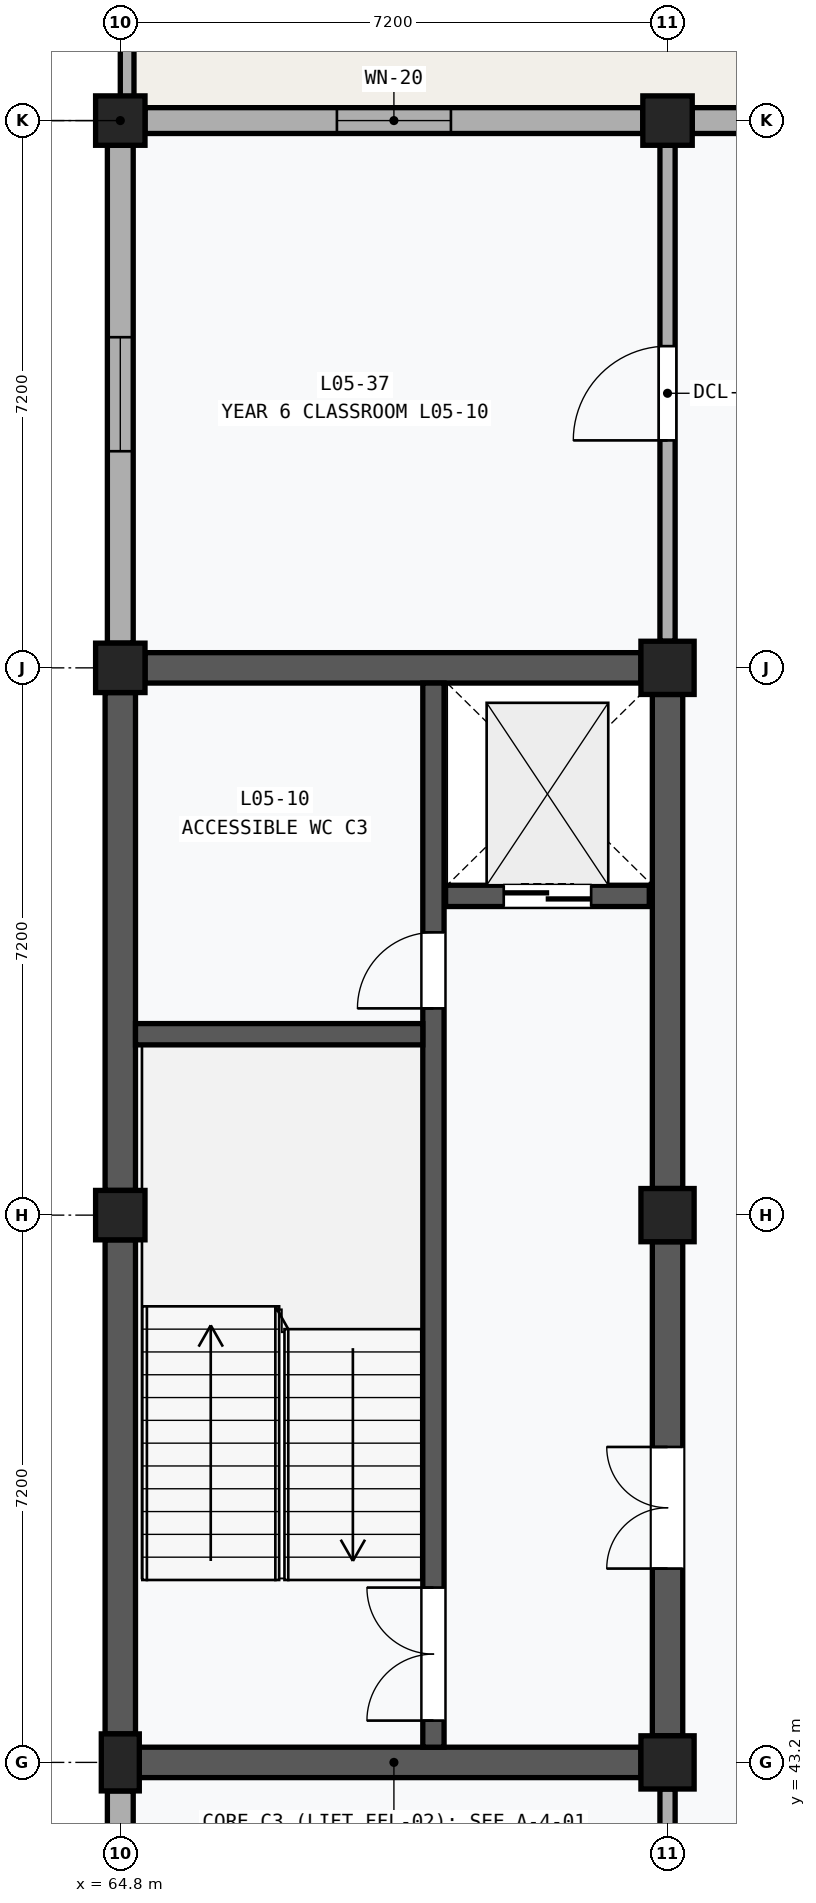
"""IFC4 building model, lengths in metres.
Left out: names, types, materials, properties, quantities, classifications, styles, units other than length and angle.
Written with IfcOpenShell. Run it as: python <this file> out.ifc"""

import sys

from ifc_helpers import new_model, si_unit, direction, frame, frame_2d, origin, origin_2d, place, context, subcontext, project, spatial, rectangle, extrude, element, fill, save


model = new_model("IFC4")
c1 = context("Model", 3, precision=1e-05, world=origin(), true_north=direction((0.0, 1.0)))
c2 = subcontext(c1, "Body", "Model", "MODEL_VIEW")
j1 = project(units=[si_unit("LENGTHUNIT", "METRE"), si_unit("PLANEANGLEUNIT", "RADIAN")], contexts=[c1])
p1 = place(None, origin())
s1 = spatial("IfcSite", under=j1, at=p1, CompositionType="ELEMENT")
p2 = place(p1, origin())
s2 = spatial("IfcBuilding", under=s1, at=p2, CompositionType="ELEMENT")
p3 = place(p2, frame((0.0, 0.0, 22.6)))
s3 = spatial("IfcBuildingStorey", under=s2, at=p3, CompositionType="ELEMENT", Elevation=22.6)
p4 = place(p3, frame((64.8, 43.2, 0.0), z_axis=(0.0, 0.0, 1.0), x_axis=(1.0, 0.0, 0.0)))
e1 = element("IfcColumn", 1, at=p4, inside=s3, PredefinedType="PILASTER", context=c2, shape_type="SweptSolid", body=[
    extrude(rectangle(XDim=0.5, YDim=0.75, at=origin_2d()), origin(), (0.0, 0.0, 1.0), 4.0),
])
for number, where, z_axis, x_axis in (
    (2, (64.8, 50.4, 0.0), (0.0, 0.0, 1.0), (1.0, 0.0, 0.0)),
    (3, (64.8, 57.6, 0.0), (0.0, 0.0, 1.0), (1.0, 0.0, 0.0)),
    (4, (64.8, 64.8, 0.0), (0.0, 0.0, 1.0), (1.0, 0.0, 0.0)),
):
    element("IfcColumn", number, at=place(p3, frame(where, z_axis=z_axis, x_axis=x_axis)), inside=s3, PredefinedType="COLUMN", context=c2, shape_type="SweptSolid", body=[
        extrude(rectangle(XDim=0.65, YDim=0.65, at=origin_2d()), origin(), (0.0, 0.0, 1.0), 4.0),
    ])
for number, where, z_axis, x_axis in (
    (5, (72.0, 43.2, 0.0), (0.0, 0.0, 1.0), (1.0, 0.0, 0.0)),
    (6, (72.0, 50.4, 0.0), (0.0, 0.0, 1.0), (1.0, 0.0, 0.0)),
    (7, (72.0, 57.6, 0.0), (0.0, 0.0, 1.0), (1.0, 0.0, 0.0)),
):
    element("IfcColumn", number, at=place(p3, frame(where, z_axis=z_axis, x_axis=x_axis)), inside=s3, PredefinedType="COLUMN", context=c2, shape_type="SweptSolid", body=[
        extrude(rectangle(XDim=0.7, YDim=0.7, at=origin_2d()), origin(), (0.0, 0.0, 1.0), 4.0),
    ])
p5 = place(p3, frame((72.0, 64.8, 0.0), z_axis=(0.0, 0.0, 1.0), x_axis=(1.0, 0.0, 0.0)))
e8 = element("IfcColumn", 8, at=p5, inside=s3, PredefinedType="COLUMN", context=c2, shape_type="SweptSolid", body=[
    extrude(rectangle(XDim=0.65, YDim=0.65, at=origin_2d()), origin(), (0.0, 0.0, 1.0), 4.0),
])
p6 = place(p3, frame((64.8, 36.325, 0.0), z_axis=(0.0, 0.0, 1.0), x_axis=(0.0, 1.0, 0.0)))
e9 = element("IfcWall", 9, at=p6, inside=s3, PredefinedType="SOLIDWALL", context=c2, shape_type="SweptSolid", body=[
    extrude(rectangle(XDim=6.5, YDim=0.34, at=frame_2d((3.25, 0.0))), origin(), (0.0, 0.0, 1.0), 3.12),
])
p7 = place(p6, frame((1.75, 0.0, 0.9)))
e10 = element("IfcOpeningElement", 10, at=p7, cuts=e9, PredefinedType="OPENING", context=c2, shape_type="SweptSolid", body=[
    extrude(rectangle(XDim=3.0, YDim=1.8, at=frame_2d((1.5, 0.9))), frame((0.0, 0.182, 0.0), z_axis=(0.0, -1.0, 0.0), x_axis=(1.0, 0.0, 0.0)), (0.0, 0.0, 1.0), 0.364),
])
p8 = place(p3, frame((65.125, 64.8, 0.0), z_axis=(0.0, 0.0, 1.0), x_axis=(1.0, 0.0, 0.0)))
e11 = element("IfcWall", 11, at=p8, inside=s3, PredefinedType="SOLIDWALL", context=c2, shape_type="SweptSolid", body=[
    extrude(rectangle(XDim=6.55, YDim=0.34, at=frame_2d((3.275, 0.0))), origin(), (0.0, 0.0, 1.0), 3.12),
])
p9 = place(p8, frame((2.525, 0.0, 1.1)))
e12 = element("IfcOpeningElement", 12, at=p9, cuts=e11, PredefinedType="OPENING", context=c2, shape_type="SweptSolid", body=[
    extrude(rectangle(XDim=1.5, YDim=1.35, at=frame_2d((0.75, 0.675))), frame((0.0, 0.182, 0.0), z_axis=(0.0, -1.0, 0.0), x_axis=(1.0, 0.0, 0.0)), (0.0, 0.0, 1.0), 0.364),
])
p10 = place(p3, frame((64.8, 57.925, 0.0), z_axis=(0.0, 0.0, 1.0), x_axis=(0.0, 1.0, 0.0)))
e13 = element("IfcWall", 13, at=p10, inside=s3, PredefinedType="SOLIDWALL", context=c2, shape_type="SweptSolid", body=[
    extrude(rectangle(XDim=6.55, YDim=0.34, at=frame_2d((3.275, 0.0))), origin(), (0.0, 0.0, 1.0), 3.12),
])
p11 = place(p10, frame((2.525, 0.0, 1.1)))
e14 = element("IfcOpeningElement", 14, at=p11, cuts=e13, PredefinedType="OPENING", context=c2, shape_type="SweptSolid", body=[
    extrude(rectangle(XDim=1.5, YDim=1.35, at=frame_2d((0.75, 0.675))), frame((0.0, 0.182, 0.0), z_axis=(0.0, -1.0, 0.0), x_axis=(1.0, 0.0, 0.0)), (0.0, 0.0, 1.0), 0.364),
])
p12 = place(p3, frame((72.325, 64.8, 0.0), z_axis=(0.0, 0.0, 1.0), x_axis=(1.0, 0.0, 0.0)))
e15 = element("IfcWall", 15, at=p12, inside=s3, PredefinedType="SOLIDWALL", context=c2, shape_type="SweptSolid", body=[
    extrude(rectangle(XDim=6.625, YDim=0.34, at=frame_2d((3.312, 0.0))), origin(), (0.0, 0.0, 1.0), 3.12),
])
p13 = place(p12, frame((2.562, 0.0, 1.1)))
e16 = element("IfcOpeningElement", 16, at=p13, cuts=e15, PredefinedType="OPENING", context=c2, shape_type="SweptSolid", body=[
    extrude(rectangle(XDim=1.5, YDim=1.35, at=frame_2d((0.75, 0.675))), frame((0.0, 0.182, 0.0), z_axis=(0.0, -1.0, 0.0), x_axis=(1.0, 0.0, 0.0)), (0.0, 0.0, 1.0), 0.364),
])
p14 = place(p3, frame((64.89, 64.89, 0.0), z_axis=(0.0, 0.0, 1.0), x_axis=(0.0, 1.0, 0.0)))
e17 = element("IfcWall", 17, at=p14, inside=s3, PredefinedType="PARAPET", context=c2, shape_type="SweptSolid", body=[
    extrude(rectangle(XDim=7.02, YDim=0.18, at=frame_2d((3.51, 0.0))), origin(), (0.0, 0.0, 1.0), 0.95),
])
p15 = place(p3, frame((64.8, 43.575, 0.0), z_axis=(0.0, 0.0, 1.0), x_axis=(0.0, 1.0, 0.0)))
e18 = element("IfcWall", 18, at=p15, inside=s3, PredefinedType="SHEAR", context=c2, shape_type="SweptSolid", body=[
    extrude(rectangle(XDim=6.5, YDim=0.4, at=frame_2d((3.25, 0.0))), origin(), (0.0, 0.0, 1.0), 3.12),
])
p16 = place(p3, frame((64.8, 50.725, 0.0), z_axis=(0.0, 0.0, 1.0), x_axis=(0.0, 1.0, 0.0)))
e19 = element("IfcWall", 19, at=p16, inside=s3, PredefinedType="SHEAR", context=c2, shape_type="SweptSolid", body=[
    extrude(rectangle(XDim=6.55, YDim=0.4, at=frame_2d((3.275, 0.0))), origin(), (0.0, 0.0, 1.0), 3.12),
])
p17 = place(p3, frame((72.0, 43.55, 0.0), z_axis=(0.0, 0.0, 1.0), x_axis=(0.0, 1.0, 0.0)))
e20 = element("IfcWall", 20, at=p17, inside=s3, PredefinedType="SHEAR", context=c2, shape_type="SweptSolid", body=[
    extrude(rectangle(XDim=6.5, YDim=0.4, at=frame_2d((3.25, 0.0))), origin(), (0.0, 0.0, 1.0), 2.98),
])
p18 = place(p17, frame((2.2, 0.0, 0.0)))
e21 = element("IfcOpeningElement", 21, at=p18, cuts=e20, PredefinedType="OPENING", context=c2, shape_type="SweptSolid", body=[
    extrude(rectangle(XDim=1.6, YDim=2.2, at=frame_2d((0.8, 1.1))), frame((0.0, 0.212, 0.0), z_axis=(0.0, -1.0, 0.0), x_axis=(1.0, 0.0, 0.0)), (0.0, 0.0, 1.0), 0.424),
])
p19 = place(p3, frame((72.0, 50.75, 0.0), z_axis=(0.0, 0.0, 1.0), x_axis=(0.0, 1.0, 0.0)))
e22 = element("IfcWall", 22, at=p19, inside=s3, PredefinedType="SHEAR", context=c2, shape_type="SweptSolid", body=[
    extrude(rectangle(XDim=6.5, YDim=0.4, at=frame_2d((3.25, 0.0))), origin(), (0.0, 0.0, 1.0), 2.98),
])
p20 = place(p3, frame((65.05, 43.2, 0.0), z_axis=(0.0, 0.0, 1.0), x_axis=(1.0, 0.0, 0.0)))
e23 = element("IfcWall", 23, at=p20, inside=s3, PredefinedType="SHEAR", context=c2, shape_type="SweptSolid", body=[
    extrude(rectangle(XDim=6.6, YDim=0.4, at=frame_2d((3.3, 0.0))), origin(), (0.0, 0.0, 1.0), 2.98),
])
p21 = place(p3, frame((65.125, 57.6, 0.0), z_axis=(0.0, 0.0, 1.0), x_axis=(1.0, 0.0, 0.0)))
e24 = element("IfcWall", 24, at=p21, inside=s3, PredefinedType="SHEAR", context=c2, shape_type="SweptSolid", body=[
    extrude(rectangle(XDim=6.525, YDim=0.4, at=frame_2d((3.262, 0.0))), origin(), (0.0, 0.0, 1.0), 2.98),
])
p22 = place(p3, frame((68.92, 43.4, 0.0), z_axis=(0.0, 0.0, 1.0), x_axis=(0.0, 1.0, 0.0)))
e25 = element("IfcWall", 25, at=p22, inside=s3, PredefinedType="SHEAR", context=c2, shape_type="SweptSolid", body=[
    extrude(rectangle(XDim=14.0, YDim=0.28, at=frame_2d((7.0, 0.0))), origin(), (0.0, 0.0, 1.0), 3.75),
])
p23 = place(p22, frame((0.35, 0.0, 0.0)))
e26 = element("IfcOpeningElement", 26, at=p23, cuts=e25, PredefinedType="OPENING", context=c2, shape_type="SweptSolid", body=[
    extrude(rectangle(XDim=1.75, YDim=2.15, at=frame_2d((0.875, 1.075))), frame((0.0, 0.152, 0.0), z_axis=(0.0, -1.0, 0.0), x_axis=(1.0, 0.0, 0.0)), (0.0, 0.0, 1.0), 0.304),
])
p24 = place(p22, frame((9.72, 0.0, 0.0)))
e27 = element("IfcOpeningElement", 27, at=p24, cuts=e25, PredefinedType="OPENING", context=c2, shape_type="SweptSolid", body=[
    extrude(rectangle(XDim=1.0, YDim=2.15, at=frame_2d((0.5, 1.075))), frame((0.0, 0.152, 0.0), z_axis=(0.0, -1.0, 0.0), x_axis=(1.0, 0.0, 0.0)), (0.0, 0.0, 1.0), 0.304),
])
p25 = place(p3, frame((65.0, 52.78, 0.0), z_axis=(0.0, 0.0, 1.0), x_axis=(1.0, 0.0, 0.0)))
e28 = element("IfcWall", 28, at=p25, inside=s3, PredefinedType="SHEAR", context=c2, shape_type="SweptSolid", body=[
    extrude(rectangle(XDim=3.78, YDim=0.28, at=frame_2d((1.89, 0.0))), origin(), (0.0, 0.0, 1.0), 3.75),
])
p26 = place(p3, frame((69.08, 54.6, 0.0), z_axis=(0.0, 0.0, 1.0), x_axis=(1.0, 0.0, 0.0)))
e29 = element("IfcWall", 29, at=p26, inside=s3, PredefinedType="SHEAR", context=c2, shape_type="SweptSolid", body=[
    extrude(rectangle(XDim=2.68, YDim=0.28, at=frame_2d((1.34, 0.0))), origin(), (0.0, 0.0, 1.0), 3.75),
])
p27 = place(p26, frame((0.765, 0.0, 0.0)))
e30 = element("IfcOpeningElement", 30, at=p27, cuts=e29, PredefinedType="OPENING", context=c2, shape_type="SweptSolid", body=[
    extrude(rectangle(XDim=1.15, YDim=2.2, at=frame_2d((0.575, 1.1))), frame((0.0, 0.152, 0.0), z_axis=(0.0, -1.0, 0.0), x_axis=(1.0, 0.0, 0.0)), (0.0, 0.0, 1.0), 0.304),
])
p28 = place(p3, frame((72.0, 36.35, 0.0), z_axis=(0.0, 0.0, 1.0), x_axis=(0.0, 1.0, 0.0)))
e31 = element("IfcWall", 31, at=p28, inside=s3, PredefinedType="PARTITIONING", context=c2, shape_type="SweptSolid", body=[
    extrude(rectangle(XDim=6.5, YDim=0.2, at=frame_2d((3.25, 0.0))), origin(), (0.0, 0.0, 1.0), 2.98),
])
p29 = place(p28, frame((2.65, 0.0, 0.0)))
e32 = element("IfcOpeningElement", 32, at=p29, cuts=e31, PredefinedType="OPENING", context=c2, shape_type="SweptSolid", body=[
    extrude(rectangle(XDim=1.2, YDim=2.24, at=frame_2d((0.6, 1.12))), frame((0.0, 0.112, 0.0), z_axis=(0.0, -1.0, 0.0), x_axis=(1.0, 0.0, 0.0)), (0.0, 0.0, 1.0), 0.224),
])
p30 = place(p3, frame((72.0, 57.95, 0.0), z_axis=(0.0, 0.0, 1.0), x_axis=(0.0, 1.0, 0.0)))
e33 = element("IfcWall", 33, at=p30, inside=s3, PredefinedType="PARTITIONING", context=c2, shape_type="SweptSolid", body=[
    extrude(rectangle(XDim=6.525, YDim=0.2, at=frame_2d((3.263, 0.0))), origin(), (0.0, 0.0, 1.0), 2.98),
])
p31 = place(p30, frame((2.643, 0.0, 0.0)))
e34 = element("IfcOpeningElement", 34, at=p31, cuts=e33, PredefinedType="OPENING", context=c2, shape_type="SweptSolid", body=[
    extrude(rectangle(XDim=1.24, YDim=2.26, at=frame_2d((0.62, 1.13))), frame((0.0, 0.112, 0.0), z_axis=(0.0, -1.0, 0.0), x_axis=(1.0, 0.0, 0.0)), (0.0, 0.0, 1.0), 0.224),
])
p32 = place(p9, origin())
e35 = element("IfcWindow", 35, at=p32, inside=s3, PartitioningType="SINGLE_PANEL", PredefinedType="WINDOW", context=c2, shape_type="SweptSolid", body=[
    extrude(rectangle(XDim=1.5, YDim=1.35, at=frame_2d((0.75, 0.675))), frame((0.0, 0.03, 0.0), z_axis=(0.0, -1.0, 0.0), x_axis=(1.0, 0.0, 0.0)), (0.0, 0.0, 1.0), 0.06),
])
fill(e12, e35)
p33 = place(p11, origin())
e36 = element("IfcWindow", 36, at=p33, inside=s3, PartitioningType="SINGLE_PANEL", PredefinedType="WINDOW", context=c2, shape_type="SweptSolid", body=[
    extrude(rectangle(XDim=1.5, YDim=1.35, at=frame_2d((0.75, 0.675))), frame((0.0, 0.03, 0.0), z_axis=(0.0, -1.0, 0.0), x_axis=(1.0, 0.0, 0.0)), (0.0, 0.0, 1.0), 0.06),
])
fill(e14, e36)
p34 = place(p18, origin())
e37 = element("IfcDoor", 37, at=p34, inside=s3, OperationType="DOUBLE_DOOR_SINGLE_SWING", PredefinedType="DOOR", context=c2, shape_type="SweptSolid", body=[
    extrude(rectangle(XDim=1.6, YDim=2.2, at=frame_2d((0.8, 1.1))), frame((0.0, 0.025, 0.0), z_axis=(0.0, -1.0, 0.0), x_axis=(1.0, 0.0, 0.0)), (0.0, 0.0, 1.0), 0.05),
])
fill(e21, e37)
p35 = place(p23, origin())
e38 = element("IfcDoor", 38, at=p35, inside=s3, OperationType="DOUBLE_DOOR_SINGLE_SWING", PredefinedType="DOOR", context=c2, shape_type="SweptSolid", body=[
    extrude(rectangle(XDim=1.75, YDim=2.15, at=frame_2d((0.875, 1.075))), frame((0.0, 0.025, 0.0), z_axis=(0.0, -1.0, 0.0), x_axis=(1.0, 0.0, 0.0)), (0.0, 0.0, 1.0), 0.05),
])
fill(e26, e38)
p36 = place(p24, origin())
e39 = element("IfcDoor", 39, at=p36, inside=s3, OperationType="SINGLE_SWING_LEFT", PredefinedType="DOOR", context=c2, shape_type="SweptSolid", body=[
    extrude(rectangle(XDim=1.0, YDim=2.15, at=frame_2d((0.5, 1.075))), frame((0.0, 0.025, 0.0), z_axis=(0.0, -1.0, 0.0), x_axis=(1.0, 0.0, 0.0)), (0.0, 0.0, 1.0), 0.05),
])
fill(e27, e39)
p37 = place(p27, frame((1.15, 0.0, 0.0), z_axis=(0.0, 0.0, 1.0), x_axis=(-1.0, 0.0, 0.0)))
e40 = element("IfcDoor", 40, at=p37, inside=s3, OperationType="DOUBLE_DOOR_SLIDING", PredefinedType="DOOR", context=c2, shape_type="SweptSolid", body=[
    extrude(rectangle(XDim=1.15, YDim=2.2, at=frame_2d((0.575, 1.1))), frame((0.0, 0.025, 0.0), z_axis=(0.0, -1.0, 0.0), x_axis=(1.0, 0.0, 0.0)), (0.0, 0.0, 1.0), 0.05),
])
fill(e30, e40)
p38 = place(p31, origin())
e41 = element("IfcDoor", 41, at=p38, inside=s3, OperationType="SINGLE_SWING_LEFT", PredefinedType="DOOR", context=c2, shape_type="SweptSolid", body=[
    extrude(rectangle(XDim=1.24, YDim=2.26, at=frame_2d((0.62, 1.13))), frame((0.0, 0.025, 0.0), z_axis=(0.0, -1.0, 0.0), x_axis=(1.0, 0.0, 0.0)), (0.0, 0.0, 1.0), 0.05),
])
fill(e34, e41)
save(model, sys.argv[1])
